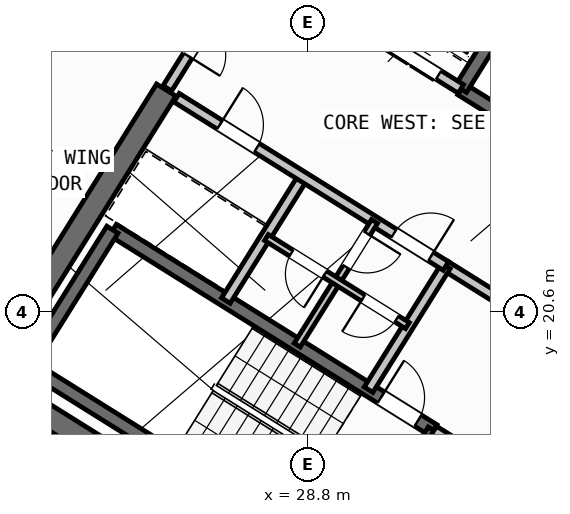
"""IFC4 building model, lengths in metres.
Left out: names, types, materials, properties, quantities, classifications, styles, units other than length and angle.
Written with IfcOpenShell. Run it as: python <this file> out.ifc"""

import sys

from ifc_helpers import new_model, si_unit, direction, frame, frame_2d, origin, place, context, subcontext, project, spatial, rectangle, extrude, source, transform, mapped, element, fill, save


model = new_model("IFC4")
c1 = context("Model", 3, precision=1e-05, world=origin(), true_north=direction((0.0, 1.0)))
c2 = subcontext(c1, "Body", "Model", "MODEL_VIEW")
j1 = project(units=[si_unit("LENGTHUNIT", "METRE"), si_unit("PLANEANGLEUNIT", "RADIAN")], contexts=[c1])
p1 = place(None, origin())
s1 = spatial("IfcSite", under=j1, at=p1, CompositionType="ELEMENT")
p2 = place(p1, origin())
s2 = spatial("IfcBuilding", under=s1, at=p2, CompositionType="ELEMENT")
p3 = place(p2, frame((0.0, 0.0, 238.5)))
s3 = spatial("IfcBuildingStorey", under=s2, at=p3, CompositionType="ELEMENT", Elevation=238.5)
p4 = place(p3, frame((40.531, 24.036, 0.0), z_axis=(0.0, 0.0, 1.0), x_axis=(-0.848048787466, 0.529918157905, 0.0)))
e1 = element("IfcWall", 1, at=p4, inside=s3, PredefinedType="SHEAR", context=c2, shape_type="SweptSolid", body=[
    extrude(rectangle(XDim=13.04, YDim=0.45, at=frame_2d((6.52, 0.0))), origin(), (0.0, 0.0, 1.0), 3.35),
])
p5 = place(p3, frame((33.324, 12.503, 0.0), z_axis=(0.0, 0.0, 1.0), x_axis=(-0.848043529849, 0.529926571782, 0.0)))
e2 = element("IfcWall", 2, at=p5, inside=s3, PredefinedType="SHEAR", context=c2, shape_type="SweptSolid", body=[
    extrude(rectangle(XDim=13.04, YDim=0.45, at=frame_2d((6.52, 0.0))), origin(), (0.0, 0.0, 1.0), 3.35),
])
p6 = place(p3, frame((26.007, 24.976, 0.0), z_axis=(0.0, 0.0, 1.0), x_axis=(-0.529931155655, -0.848040665456, 0.0)))
e3 = element("IfcWall", 3, at=p6, inside=s3, PredefinedType="SHEAR", context=c2, shape_type="SweptSolid", body=[
    extrude(rectangle(XDim=6.475, YDim=0.45, at=frame_2d((3.238, 0.0))), origin(), (0.0, 0.0, 1.0), 3.35),
])
p7 = place(p3, frame((29.268, 6.429, 0.0), z_axis=(0.0, 0.0, 1.0), x_axis=(-0.848049971435, 0.529916263149, 0.0)))
e4 = element("IfcWall", 4, at=p7, inside=s3, PredefinedType="STANDARD", context=c2, shape_type="SweptSolid", body=[
    extrude(rectangle(XDim=31.588, YDim=0.32, at=frame_2d((15.794, 0.0))), origin(), (0.0, 0.0, 1.0), 3.35),
])
p8 = place(p7, frame((16.235, 0.0, 0.0)))
e5 = element("IfcOpeningElement", 5, at=p8, cuts=e4, PredefinedType="OPENING", context=c2, shape_type="SweptSolid", body=[
    extrude(rectangle(XDim=1.2, YDim=2.15, at=frame_2d((0.6, 1.075))), frame((0.0, 0.17, 0.0), z_axis=(0.0, -1.0, 0.0), x_axis=(1.0, 0.0, 0.0)), (0.0, 0.0, 1.0), 0.34),
])
p9 = place(p7, frame((3.859, 0.0, 0.9)))
e6 = element("IfcOpeningElement", 6, at=p9, cuts=e4, PredefinedType="OPENING", context=c2, shape_type="SweptSolid", body=[
    extrude(rectangle(XDim=1.65, YDim=1.45, at=frame_2d((0.825, 0.725))), frame((0.0, 0.17, 0.0), z_axis=(0.0, -1.0, 0.0), x_axis=(1.0, 0.0, 0.0)), (0.0, 0.0, 1.0), 0.34),
])
p10 = place(p7, frame((10.519, 0.0, 0.9)))
e7 = element("IfcOpeningElement", 7, at=p10, cuts=e4, PredefinedType="OPENING", context=c2, shape_type="SweptSolid", body=[
    extrude(rectangle(XDim=1.65, YDim=1.45, at=frame_2d((0.825, 0.725))), frame((0.0, 0.17, 0.0), z_axis=(0.0, -1.0, 0.0), x_axis=(1.0, 0.0, 0.0)), (0.0, 0.0, 1.0), 0.34),
])
p11 = place(p7, frame((19.182, 0.0, 1.0)))
e8 = element("IfcOpeningElement", 8, at=p11, cuts=e4, PredefinedType="OPENING", context=c2, shape_type="SweptSolid", body=[
    extrude(rectangle(XDim=0.9, YDim=1.25, at=frame_2d((0.45, 0.625))), frame((0.0, 0.17, 0.0), z_axis=(0.0, -1.0, 0.0), x_axis=(1.0, 0.0, 0.0)), (0.0, 0.0, 1.0), 0.34),
])
p12 = place(p7, frame((22.524, 0.0, 1.0)))
e9 = element("IfcOpeningElement", 9, at=p12, cuts=e4, PredefinedType="OPENING", context=c2, shape_type="SweptSolid", body=[
    extrude(rectangle(XDim=0.9, YDim=1.25, at=frame_2d((0.45, 0.625))), frame((0.0, 0.17, 0.0), z_axis=(0.0, -1.0, 0.0), x_axis=(1.0, 0.0, 0.0)), (0.0, 0.0, 1.0), 0.34),
])
p13 = place(p7, frame((25.658, 0.0, 0.9)))
e10 = element("IfcOpeningElement", 10, at=p13, cuts=e4, PredefinedType="OPENING", context=c2, shape_type="SweptSolid", body=[
    extrude(rectangle(XDim=1.65, YDim=1.45, at=frame_2d((0.825, 0.725))), frame((0.0, 0.17, 0.0), z_axis=(0.0, -1.0, 0.0), x_axis=(1.0, 0.0, 0.0)), (0.0, 0.0, 1.0), 0.34),
])
p14 = place(p7, frame((29.278, 0.0, 0.9)))
e11 = element("IfcOpeningElement", 11, at=p14, cuts=e4, PredefinedType="OPENING", context=c2, shape_type="SweptSolid", body=[
    extrude(rectangle(XDim=1.35, YDim=1.45, at=frame_2d((0.675, 0.725))), frame((0.0, 0.17, 0.0), z_axis=(0.0, -1.0, 0.0), x_axis=(1.0, 0.0, 0.0)), (0.0, 0.0, 1.0), 0.34),
])
p15 = place(p3, frame((14.138, 41.825, 0.0), z_axis=(0.0, 0.0, 1.0), x_axis=(0.848046498049, -0.529921821731, 0.0)))
e12 = element("IfcWall", 12, at=p15, inside=s3, PredefinedType="STANDARD", context=c2, shape_type="SweptSolid", body=[
    extrude(rectangle(XDim=31.588, YDim=0.32, at=frame_2d((15.794, 0.0))), origin(), (0.0, 0.0, 1.0), 3.35),
])
p16 = place(p15, frame((9.712, 0.0, 0.0)))
e13 = element("IfcOpeningElement", 13, at=p16, cuts=e12, PredefinedType="OPENING", context=c2, shape_type="SweptSolid", body=[
    extrude(rectangle(XDim=1.05, YDim=2.15, at=frame_2d((0.525, 1.075))), frame((0.0, 0.17, 0.0), z_axis=(0.0, -1.0, 0.0), x_axis=(1.0, 0.0, 0.0)), (0.0, 0.0, 1.0), 0.34),
])
p17 = place(p15, frame((0.841, 0.0, 0.9)))
e14 = element("IfcOpeningElement", 14, at=p17, cuts=e12, PredefinedType="OPENING", context=c2, shape_type="SweptSolid", body=[
    extrude(rectangle(XDim=1.65, YDim=1.45, at=frame_2d((0.825, 0.725))), frame((0.0, 0.17, 0.0), z_axis=(0.0, -1.0, 0.0), x_axis=(1.0, 0.0, 0.0)), (0.0, 0.0, 1.0), 0.34),
])
p18 = place(p15, frame((4.171, 0.0, 1.0)))
e15 = element("IfcOpeningElement", 15, at=p18, cuts=e12, PredefinedType="OPENING", context=c2, shape_type="SweptSolid", body=[
    extrude(rectangle(XDim=0.9, YDim=1.25, at=frame_2d((0.45, 0.625))), frame((0.0, 0.17, 0.0), z_axis=(0.0, -1.0, 0.0), x_axis=(1.0, 0.0, 0.0)), (0.0, 0.0, 1.0), 0.34),
])
p19 = place(p15, frame((13.624, 0.0, 0.95)))
e16 = element("IfcOpeningElement", 16, at=p19, cuts=e12, PredefinedType="OPENING", context=c2, shape_type="SweptSolid", body=[
    extrude(rectangle(XDim=1.95, YDim=1.35, at=frame_2d((0.975, 0.675))), frame((0.0, 0.17, 0.0), z_axis=(0.0, -1.0, 0.0), x_axis=(1.0, 0.0, 0.0)), (0.0, 0.0, 1.0), 0.34),
])
p20 = place(p15, frame((17.129, 0.0, 1.0)))
e17 = element("IfcOpeningElement", 17, at=p20, cuts=e12, PredefinedType="OPENING", context=c2, shape_type="SweptSolid", body=[
    extrude(rectangle(XDim=0.9, YDim=1.25, at=frame_2d((0.45, 0.625))), frame((0.0, 0.17, 0.0), z_axis=(0.0, -1.0, 0.0), x_axis=(1.0, 0.0, 0.0)), (0.0, 0.0, 1.0), 0.34),
])
p21 = place(p15, frame((21.744, 0.0, 0.9)))
e18 = element("IfcOpeningElement", 18, at=p21, cuts=e12, PredefinedType="OPENING", context=c2, shape_type="SweptSolid", body=[
    extrude(rectangle(XDim=1.65, YDim=1.45, at=frame_2d((0.825, 0.725))), frame((0.0, 0.17, 0.0), z_axis=(0.0, -1.0, 0.0), x_axis=(1.0, 0.0, 0.0)), (0.0, 0.0, 1.0), 0.34),
])
p22 = place(p15, frame((27.394, 0.0, 0.9)))
e19 = element("IfcOpeningElement", 19, at=p22, cuts=e12, PredefinedType="OPENING", context=c2, shape_type="SweptSolid", body=[
    extrude(rectangle(XDim=1.65, YDim=1.45, at=frame_2d((0.825, 0.725))), frame((0.0, 0.17, 0.0), z_axis=(0.0, -1.0, 0.0), x_axis=(1.0, 0.0, 0.0)), (0.0, 0.0, 1.0), 0.34),
])
p23 = place(p3, frame((29.605, 15.581, 0.0), z_axis=(0.0, 0.0, 1.0), x_axis=(-0.848036911448, 0.529937163087, 0.0)))
e20 = element("IfcWall", 20, at=p23, inside=s3, PredefinedType="SHEAR", context=c2, shape_type="SweptSolid", body=[
    extrude(rectangle(XDim=7.46, YDim=0.26, at=frame_2d((3.73, 0.0))), origin(), (0.0, 0.0, 1.0), 3.35),
])
p24 = place(p3, frame((31.28, 18.261, 0.0), z_axis=(0.0, 0.0, 1.0), x_axis=(-0.848051618787, 0.529913626805, 0.0)))
e21 = element("IfcWall", 21, at=p24, inside=s3, PredefinedType="SHEAR", context=c2, shape_type="SweptSolid", body=[
    extrude(rectangle(XDim=7.46, YDim=0.26, at=frame_2d((3.73, 0.0))), origin(), (0.0, 0.0, 1.0), 3.35),
])
p25 = place(p24, frame((0.36, 0.0, 0.0)))
e22 = element("IfcOpeningElement", 22, at=p25, cuts=e21, PredefinedType="OPENING", context=c2, shape_type="SweptSolid", body=[
    extrude(rectangle(XDim=0.86, YDim=2.05, at=frame_2d((0.43, 1.025))), frame((0.0, 0.14, 0.0), z_axis=(0.0, -1.0, 0.0), x_axis=(1.0, 0.0, 0.0)), (0.0, 0.0, 1.0), 0.28),
])
p26 = place(p3, frame((31.288, 18.256, 0.0), z_axis=(0.0, 0.0, 1.0), x_axis=(-0.529943379326, -0.848033026897, 0.0)))
e23 = element("IfcWall", 23, at=p26, inside=s3, PredefinedType="SHEAR", context=c2, shape_type="SweptSolid", body=[
    extrude(rectangle(XDim=3.16, YDim=0.26, at=frame_2d((1.58, 0.0))), origin(), (0.0, 0.0, 1.0), 3.35),
])
p27 = place(p3, frame((24.945, 22.22, 0.0), z_axis=(0.0, 0.0, 1.0), x_axis=(-0.529908658664, -0.84805472316, 0.0)))
e24 = element("IfcWall", 24, at=p27, inside=s3, PredefinedType="SHEAR", context=c2, shape_type="SweptSolid", body=[
    extrude(rectangle(XDim=3.16, YDim=0.26, at=frame_2d((1.58, 0.0))), origin(), (0.0, 0.0, 1.0), 3.35),
])
p28 = place(p3, frame((38.046, 21.108, 0.0), z_axis=(0.0, 0.0, 1.0), x_axis=(-0.848054434086, 0.529909121291, 0.0)))
e25 = element("IfcWall", 25, at=p28, inside=s3, PredefinedType="SHEAR", context=c2, shape_type="SweptSolid", body=[
    extrude(rectangle(XDim=7.33, YDim=0.26, at=frame_2d((3.665, 0.0))), origin(), (0.0, 0.0, 1.0), 3.35),
])
p29 = place(p28, frame((0.22, 0.0, 0.0)))
e26 = element("IfcOpeningElement", 26, at=p29, cuts=e25, PredefinedType="OPENING", context=c2, shape_type="SweptSolid", body=[
    extrude(rectangle(XDim=1.1, YDim=2.1, at=frame_2d((0.55, 1.05))), frame((0.0, 0.14, 0.0), z_axis=(0.0, -1.0, 0.0), x_axis=(1.0, 0.0, 0.0)), (0.0, 0.0, 1.0), 0.28),
])
p30 = place(p3, frame((33.496, 27.677, 0.0), z_axis=(0.0, 0.0, 1.0), x_axis=(-0.529908658664, -0.84805472316, 0.0)))
e27 = element("IfcWall", 27, at=p30, inside=s3, PredefinedType="SHEAR", context=c2, shape_type="SweptSolid", body=[
    extrude(rectangle(XDim=3.16, YDim=0.26, at=frame_2d((1.58, 0.0))), origin(), (0.0, 0.0, 1.0), 3.35),
])
p31 = place(p3, frame((34.933, 15.978, 0.0), z_axis=(0.0, 0.0, 1.0), x_axis=(-0.848055739377, 0.529907032327, 0.0)))
e28 = element("IfcWall", 28, at=p31, inside=s3, PredefinedType="STANDARD", context=c2, shape_type="SweptSolid", body=[
    extrude(rectangle(XDim=4.298, YDim=0.2, at=frame_2d((2.149, 0.0))), origin(), (0.0, 0.0, 1.0), 3.34),
])
p32 = place(p31, frame((0.448, 0.0, 0.0)))
e29 = element("IfcOpeningElement", 29, at=p32, cuts=e28, PredefinedType="OPENING", context=c2, shape_type="SweptSolid", body=[
    extrude(rectangle(XDim=1.3, YDim=2.2, at=frame_2d((0.65, 1.1))), frame((0.0, 0.11, 0.0), z_axis=(0.0, -1.0, 0.0), x_axis=(1.0, 0.0, 0.0)), (0.0, 0.0, 1.0), 0.22),
])
p33 = place(p31, frame((2.523, 0.0, 0.0)))
e30 = element("IfcOpeningElement", 30, at=p33, cuts=e28, PredefinedType="OPENING", context=c2, shape_type="SweptSolid", body=[
    extrude(rectangle(XDim=1.45, YDim=2.25, at=frame_2d((0.725, 1.125))), frame((0.0, 0.11, 0.0), z_axis=(0.0, -1.0, 0.0), x_axis=(1.0, 0.0, 0.0)), (0.0, 0.0, 1.0), 0.22),
])
p34 = place(p3, frame((36.459, 18.421, 0.0), z_axis=(0.0, 0.0, 1.0), x_axis=(-0.848059591691, 0.529900867089, 0.0)))
e31 = element("IfcWall", 31, at=p34, inside=s3, PredefinedType="STANDARD", context=c2, shape_type="SweptSolid", body=[
    extrude(rectangle(XDim=5.818, YDim=0.2, at=frame_2d((2.909, 0.0))), origin(), (0.0, 0.0, 1.0), 3.34),
])
p35 = place(p34, frame((2.598, 0.0, 0.0)))
e32 = element("IfcOpeningElement", 32, at=p35, cuts=e31, PredefinedType="OPENING", context=c2, shape_type="SweptSolid", body=[
    extrude(rectangle(XDim=1.15, YDim=2.1, at=frame_2d((0.575, 1.05))), frame((0.0, 0.11, 0.0), z_axis=(0.0, -1.0, 0.0), x_axis=(1.0, 0.0, 0.0)), (0.0, 0.0, 1.0), 0.22),
])
p36 = place(p3, frame((31.822, 24.998, 0.0), z_axis=(0.0, 0.0, 1.0), x_axis=(-0.848054125777, 0.529909614701, 0.0)))
e33 = element("IfcWall", 33, at=p36, inside=s3, PredefinedType="STANDARD", context=c2, shape_type="SweptSolid", body=[
    extrude(rectangle(XDim=4.668, YDim=0.2, at=frame_2d((2.334, 0.0))), origin(), (0.0, 0.0, 1.0), 3.34),
])
p37 = place(p36, frame((0.52, 0.0, 0.0)))
e34 = element("IfcOpeningElement", 34, at=p37, cuts=e33, PredefinedType="OPENING", context=c2, shape_type="SweptSolid", body=[
    extrude(rectangle(XDim=1.2, YDim=2.15, at=frame_2d((0.6, 1.075))), frame((0.0, 0.11, 0.0), z_axis=(0.0, -1.0, 0.0), x_axis=(1.0, 0.0, 0.0)), (0.0, 0.0, 1.0), 0.22),
])
p38 = place(p36, frame((2.54, 0.0, 0.0)))
e35 = element("IfcOpeningElement", 35, at=p38, cuts=e33, PredefinedType="OPENING", context=c2, shape_type="SweptSolid", body=[
    extrude(rectangle(XDim=1.2, YDim=2.15, at=frame_2d((0.6, 1.075))), frame((0.0, 0.11, 0.0), z_axis=(0.0, -1.0, 0.0), x_axis=(1.0, 0.0, 0.0)), (0.0, 0.0, 1.0), 0.22),
])
for number, where, z_axis, x_axis in (
    (36, (31.525, 21.504, 0.0), (0.0, 0.0, 1.0), (-0.53, -0.848, 0.0)),
    (37, (28.71, 23.263, 0.0), (0.0, 0.0, 1.0), (-0.53, -0.848, 0.0)),
):
    element("IfcWall", number, at=place(p3, frame(where, z_axis=z_axis, x_axis=x_axis)), inside=s3, PredefinedType="STANDARD", context=c2, shape_type="SweptSolid", body=[
        extrude(rectangle(XDim=2.88, YDim=0.2, at=frame_2d((1.44, 0.0))), origin(), (0.0, 0.0, 1.0), 3.34),
    ])
p39 = place(p3, frame((31.525, 21.504, 0.0), z_axis=(0.0, 0.0, 1.0), x_axis=(-0.848042066329, 0.529928913853, 0.0)))
e38 = element("IfcWall", 38, at=p39, inside=s3, PredefinedType="STANDARD", context=c2, shape_type="SweptSolid", body=[
    extrude(rectangle(XDim=6.268, YDim=0.2, at=frame_2d((3.134, 0.0))), origin(), (0.0, 0.0, 1.0), 3.34),
])
p40 = place(p39, frame((4.4, 0.0, 0.0)))
e39 = element("IfcOpeningElement", 39, at=p40, cuts=e38, PredefinedType="OPENING", context=c2, shape_type="SweptSolid", body=[
    extrude(rectangle(XDim=0.86, YDim=2.05, at=frame_2d((0.43, 1.025))), frame((0.0, 0.11, 0.0), z_axis=(0.0, -1.0, 0.0), x_axis=(1.0, 0.0, 0.0)), (0.0, 0.0, 1.0), 0.22),
])
p41 = place(p39, frame((0.35, 0.0, 0.0)))
e40 = element("IfcOpeningElement", 40, at=p41, cuts=e38, PredefinedType="OPENING", context=c2, shape_type="SweptSolid", body=[
    extrude(rectangle(XDim=0.86, YDim=2.05, at=frame_2d((0.43, 1.025))), frame((0.0, 0.11, 0.0), z_axis=(0.0, -1.0, 0.0), x_axis=(1.0, 0.0, 0.0)), (0.0, 0.0, 1.0), 0.22),
])
p42 = place(p3, frame((30.117, 22.384, 0.0), z_axis=(0.0, 0.0, 1.0), x_axis=(-0.529951914384, -0.848027693204, 0.0)))
e41 = element("IfcWall", 41, at=p42, inside=s3, PredefinedType="PLUMBINGWALL", context=c2, shape_type="SweptSolid", body=[
    extrude(rectangle(XDim=1.4, YDim=0.14, at=frame_2d((0.7, 0.0))), origin(), (0.0, 0.0, 1.0), 3.34),
])
p43 = place(p42, frame((0.28, 0.0, 0.0)))
e42 = element("IfcOpeningElement", 42, at=p43, cuts=e41, PredefinedType="OPENING", context=c2, shape_type="SweptSolid", body=[
    extrude(rectangle(XDim=0.78, YDim=2.05, at=frame_2d((0.39, 1.025))), frame((0.0, 0.08, 0.0), z_axis=(0.0, -1.0, 0.0), x_axis=(1.0, 0.0, 0.0)), (0.0, 0.0, 1.0), 0.16),
])
p44 = place(p3, frame((29.375, 21.196, 0.0), z_axis=(0.0, 0.0, 1.0), x_axis=(-0.529865479138, -0.848081702443, 0.0)))
e43 = element("IfcWall", 43, at=p44, inside=s3, PredefinedType="PLUMBINGWALL", context=c2, shape_type="SweptSolid", body=[
    extrude(rectangle(XDim=1.48, YDim=0.14, at=frame_2d((0.74, 0.0))), origin(), (0.0, 0.0, 1.0), 3.34),
])
p45 = place(p3, frame((30.766, 20.327, 0.0), z_axis=(0.0, 0.0, 1.0), x_axis=(-0.848052663127, 0.529911955482, 0.0)))
e44 = element("IfcWall", 44, at=p45, inside=s3, PredefinedType="PLUMBINGWALL", context=c2, shape_type="SweptSolid", body=[
    extrude(rectangle(XDim=3.28, YDim=0.14, at=frame_2d((1.64, 0.0))), origin(), (0.0, 0.0, 1.0), 3.34),
])
p46 = place(p45, frame((0.25, 0.0, 0.0)))
e45 = element("IfcOpeningElement", 45, at=p46, cuts=e44, PredefinedType="OPENING", context=c2, shape_type="SweptSolid", body=[
    extrude(rectangle(XDim=0.78, YDim=2.05, at=frame_2d((0.39, 1.025))), frame((0.0, 0.08, 0.0), z_axis=(0.0, -1.0, 0.0), x_axis=(1.0, 0.0, 0.0)), (0.0, 0.0, 1.0), 0.16),
])
p47 = place(p45, frame((1.92, 0.0, 0.0)))
e46 = element("IfcOpeningElement", 46, at=p47, cuts=e44, PredefinedType="OPENING", context=c2, shape_type="SweptSolid", body=[
    extrude(rectangle(XDim=0.78, YDim=2.05, at=frame_2d((0.39, 1.025))), frame((0.0, 0.08, 0.0), z_axis=(0.0, -1.0, 0.0), x_axis=(1.0, 0.0, 0.0)), (0.0, 0.0, 1.0), 0.16),
])
p48 = place(p3, frame((27.596, 27.52, 0.0), z_axis=(0.0, 0.0, 1.0), x_axis=(-0.529865479138, -0.848081702443, 0.0)))
e47 = element("IfcWall", 47, at=p48, inside=s3, PredefinedType="STANDARD", context=c2, shape_type="SweptSolid", body=[
    extrude(rectangle(XDim=2.96, YDim=0.2, at=frame_2d((1.48, 0.0))), origin(), (0.0, 0.0, 1.0), 3.34),
])
p49 = place(p48, frame((0.7, 0.0, 0.0)))
e48 = element("IfcOpeningElement", 48, at=p49, cuts=e47, PredefinedType="OPENING", context=c2, shape_type="SweptSolid", body=[
    extrude(rectangle(XDim=1.5, YDim=2.15, at=frame_2d((0.75, 1.075))), frame((0.0, 0.11, 0.0), z_axis=(0.0, -1.0, 0.0), x_axis=(1.0, 0.0, 0.0)), (0.0, 0.0, 1.0), 0.22),
])
p50 = place(p3, frame((27.953, 33.016, 0.0), z_axis=(0.0, 0.0, 1.0), x_axis=(-0.529903001606, -0.848058257957, 0.0)))
e49 = element("IfcWall", 49, at=p50, inside=s3, PredefinedType="PARTITIONING", context=c2, shape_type="SweptSolid", body=[
    extrude(rectangle(XDim=9.15, YDim=0.16, at=frame_2d((4.575, 0.0))), origin(), (0.0, 0.0, 1.0), 3.34),
])
p51 = place(p3, frame((32.164, 10.374, 0.0), z_axis=(0.0, 0.0, 1.0), x_axis=(-0.848044107957, 0.529925646633, 0.0)))
e50 = element("IfcWall", 50, at=p51, inside=s3, PredefinedType="PARTITIONING", context=c2, shape_type="SweptSolid", body=[
    extrude(rectangle(XDim=15.57, YDim=0.16, at=frame_2d((7.785, 0.0))), origin(), (0.0, 0.0, 1.0), 3.34),
])
p52 = place(p51, frame((10.83, 0.0, 0.0)))
e51 = element("IfcOpeningElement", 51, at=p52, cuts=e50, PredefinedType="OPENING", context=c2, shape_type="SweptSolid", body=[
    extrude(rectangle(XDim=1.0, YDim=2.1, at=frame_2d((0.5, 1.05))), frame((0.0, 0.09, 0.0), z_axis=(0.0, -1.0, 0.0), x_axis=(1.0, 0.0, 0.0)), (0.0, 0.0, 1.0), 0.18),
])
m1 = source(origin(), c2, "Body", "SweptSolid", [
    extrude(rectangle(XDim=0.86, YDim=2.05, at=frame_2d((0.43, 1.025))), frame((0.0, 0.025, 0.0), z_axis=(0.0, -1.0, 0.0), x_axis=(1.0, 0.0, 0.0)), (0.0, 0.0, 1.0), 0.05),
])
p53 = place(p25, frame((0.86, 0.0, 0.0), z_axis=(0.0, 0.0, 1.0), x_axis=(-1.0, 0.0, 0.0)))
e52 = element("IfcDoor", 52, at=p53, inside=s3, OperationType="SINGLE_SWING_LEFT", PredefinedType="DOOR", context=c2, shape_type="MappedRepresentation", body=[
    mapped(m1, transform((0.0, 0.0, 0.0), scale=1.0)),
])
fill(e22, e52)
m2 = source(origin(), c2, "Body", "SweptSolid", [
    extrude(rectangle(XDim=1.2, YDim=2.15, at=frame_2d((0.6, 1.075))), frame((0.0, 0.025, 0.0), z_axis=(0.0, -1.0, 0.0), x_axis=(1.0, 0.0, 0.0)), (0.0, 0.0, 1.0), 0.05),
])
p54 = place(p37, origin())
e53 = element("IfcDoor", 53, at=p54, inside=s3, OperationType="DOUBLE_DOOR_SLIDING", PredefinedType="DOOR", context=c2, shape_type="MappedRepresentation", body=[
    mapped(m2, transform((0.0, 0.0, 0.0), scale=1.0)),
])
fill(e34, e53)
p55 = place(p40, frame((0.86, 0.0, 0.0), z_axis=(0.0, 0.0, 1.0), x_axis=(-1.0, 0.0, 0.0)))
e54 = element("IfcDoor", 54, at=p55, inside=s3, OperationType="SINGLE_SWING_LEFT", PredefinedType="DOOR", context=c2, shape_type="MappedRepresentation", body=[
    mapped(m1, transform((0.0, 0.0, 0.0), scale=1.0)),
])
fill(e39, e54)
p56 = place(p41, frame((0.86, 0.0, 0.0), z_axis=(0.0, 0.0, 1.0), x_axis=(-1.0, 0.0, 0.0)))
e55 = element("IfcDoor", 55, at=p56, inside=s3, OperationType="SINGLE_SWING_RIGHT", PredefinedType="DOOR", context=c2, shape_type="MappedRepresentation", body=[
    mapped(m1, transform((0.0, 0.0, 0.0), scale=1.0)),
])
fill(e40, e55)
m3 = source(origin(), c2, "Body", "SweptSolid", [
    extrude(rectangle(XDim=0.78, YDim=2.05, at=frame_2d((0.39, 1.025))), frame((0.0, 0.025, 0.0), z_axis=(0.0, -1.0, 0.0), x_axis=(1.0, 0.0, 0.0)), (0.0, 0.0, 1.0), 0.05),
])
p57 = place(p43, origin())
e56 = element("IfcDoor", 56, at=p57, inside=s3, OperationType="SINGLE_SWING_LEFT", PredefinedType="DOOR", context=c2, shape_type="MappedRepresentation", body=[
    mapped(m3, transform((0.0, 0.0, 0.0), scale=1.0)),
])
fill(e42, e56)
p58 = place(p46, origin())
e57 = element("IfcDoor", 57, at=p58, inside=s3, OperationType="SINGLE_SWING_RIGHT", PredefinedType="DOOR", context=c2, shape_type="MappedRepresentation", body=[
    mapped(m3, transform((0.0, 0.0, 0.0), scale=1.0)),
])
fill(e45, e57)
p59 = place(p47, origin())
e58 = element("IfcDoor", 58, at=p59, inside=s3, OperationType="SINGLE_SWING_LEFT", PredefinedType="DOOR", context=c2, shape_type="MappedRepresentation", body=[
    mapped(m3, transform((0.0, 0.0, 0.0), scale=1.0)),
])
fill(e46, e58)
m4 = source(origin(), c2, "Body", "SweptSolid", [
    extrude(rectangle(XDim=1.5, YDim=2.15, at=frame_2d((0.75, 1.075))), frame((0.0, 0.025, 0.0), z_axis=(0.0, -1.0, 0.0), x_axis=(1.0, 0.0, 0.0)), (0.0, 0.0, 1.0), 0.05),
])
p60 = place(p49, origin())
e59 = element("IfcDoor", 59, at=p60, inside=s3, OperationType="DOUBLE_DOOR_SINGLE_SWING", PredefinedType="DOOR", context=c2, shape_type="MappedRepresentation", body=[
    mapped(m4, transform((0.0, 0.0, 0.0), scale=1.0)),
])
fill(e48, e59)
save(model, sys.argv[1])
